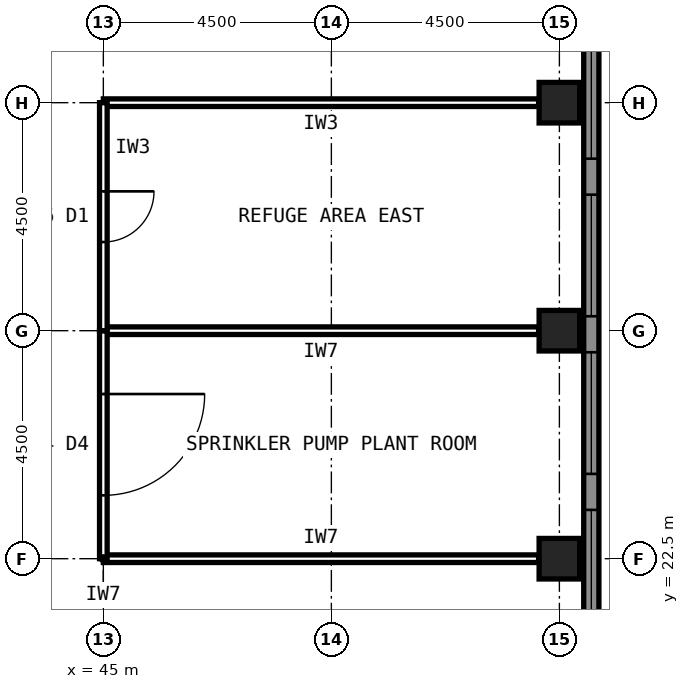
"""IFC4 building model, lengths in metres.
Left out: names, types, materials, properties, quantities, classifications, styles, units other than length and angle.
Written with IfcOpenShell. Run it as: python <this file> out.ifc"""

import sys

from ifc_helpers import new_model, si_unit, direction, frame, frame_2d, origin, origin_2d, place, context, subcontext, project, spatial, rectangle, hollow_rectangle, extrude, element, fill, save


model = new_model("IFC4")
c1 = context("Model", 3, precision=1e-05, world=origin(), true_north=direction((0.0, 1.0)))
c2 = subcontext(c1, "Body", "Model", "MODEL_VIEW")
j1 = project(units=[si_unit("LENGTHUNIT", "METRE"), si_unit("PLANEANGLEUNIT", "RADIAN")], contexts=[c1])
p1 = place(None, origin())
s1 = spatial("IfcSite", under=j1, at=p1, CompositionType="ELEMENT")
p2 = place(p1, origin())
s2 = spatial("IfcBuilding", under=s1, at=p2, CompositionType="ELEMENT")
p3 = place(p2, frame((0.0, 0.0, 199.6)))
s3 = spatial("IfcBuildingStorey", under=s2, at=p3, CompositionType="ELEMENT", Elevation=199.6)
for number, where, z_axis, x_axis in (
    (1, (54.0, 22.5, 0.0), (0.0, 0.0, 1.0), (1.0, 0.0, 0.0)),
    (2, (54.0, 27.0, 0.0), (0.0, 0.0, 1.0), (1.0, 0.0, 0.0)),
    (3, (54.0, 31.5, 0.0), (0.0, 0.0, 1.0), (1.0, 0.0, 0.0)),
):
    element("IfcColumn", number, at=place(p3, frame(where, z_axis=z_axis, x_axis=x_axis)), inside=s3, PredefinedType="COLUMN", context=c2, shape_type="SweptSolid", body=[
        extrude(hollow_rectangle(XDim=0.8, YDim=0.8, WallThickness=0.045, at=origin_2d()), origin(), (0.0, 0.0, 1.0), 6.0),
    ])
p4 = place(p3, frame((54.63, 36.261, 0.0), z_axis=(0.0, 0.0, 1.0), x_axis=(0.0, -1.0, 0.0)))
e4 = element("IfcWall", 4, at=p4, inside=s3, PredefinedType="SOLIDWALL", context=c2, shape_type="SweptSolid", body=[
    extrude(rectangle(XDim=18.663, YDim=0.3, at=frame_2d((9.332, 0.0))), origin(), (0.0, 0.0, 1.0), 6.0),
])
p5 = place(p4, frame((0.355, 0.0, 1.2)))
e5 = element("IfcOpeningElement", 5, at=p5, cuts=e4, PredefinedType="OPENING", context=c2, shape_type="SweptSolid", body=[
    extrude(rectangle(XDim=2.4, YDim=3.0, at=frame_2d((1.2, 1.5))), frame((0.0, 0.16, 0.0), z_axis=(0.0, -1.0, 0.0), x_axis=(1.0, 0.0, 0.0)), (0.0, 0.0, 1.0), 0.32),
])
p6 = place(p4, frame((3.466, 0.0, 1.2)))
e6 = element("IfcOpeningElement", 6, at=p6, cuts=e4, PredefinedType="OPENING", context=c2, shape_type="SweptSolid", body=[
    extrude(rectangle(XDim=2.4, YDim=3.0, at=frame_2d((1.2, 1.5))), frame((0.0, 0.16, 0.0), z_axis=(0.0, -1.0, 0.0), x_axis=(1.0, 0.0, 0.0)), (0.0, 0.0, 1.0), 0.32),
])
p7 = place(p4, frame((6.576, 0.0, 1.2)))
e7 = element("IfcOpeningElement", 7, at=p7, cuts=e4, PredefinedType="OPENING", context=c2, shape_type="SweptSolid", body=[
    extrude(rectangle(XDim=2.4, YDim=3.0, at=frame_2d((1.2, 1.5))), frame((0.0, 0.16, 0.0), z_axis=(0.0, -1.0, 0.0), x_axis=(1.0, 0.0, 0.0)), (0.0, 0.0, 1.0), 0.32),
])
p8 = place(p4, frame((9.687, 0.0, 1.2)))
e8 = element("IfcOpeningElement", 8, at=p8, cuts=e4, PredefinedType="OPENING", context=c2, shape_type="SweptSolid", body=[
    extrude(rectangle(XDim=2.4, YDim=3.0, at=frame_2d((1.2, 1.5))), frame((0.0, 0.16, 0.0), z_axis=(0.0, -1.0, 0.0), x_axis=(1.0, 0.0, 0.0)), (0.0, 0.0, 1.0), 0.32),
])
p9 = place(p4, frame((12.798, 0.0, 1.2)))
e9 = element("IfcOpeningElement", 9, at=p9, cuts=e4, PredefinedType="OPENING", context=c2, shape_type="SweptSolid", body=[
    extrude(rectangle(XDim=2.4, YDim=3.0, at=frame_2d((1.2, 1.5))), frame((0.0, 0.16, 0.0), z_axis=(0.0, -1.0, 0.0), x_axis=(1.0, 0.0, 0.0)), (0.0, 0.0, 1.0), 0.32),
])
p10 = place(p4, frame((15.908, 0.0, 1.2)))
e10 = element("IfcOpeningElement", 10, at=p10, cuts=e4, PredefinedType="OPENING", context=c2, shape_type="SweptSolid", body=[
    extrude(rectangle(XDim=2.4, YDim=3.0, at=frame_2d((1.2, 1.5))), frame((0.0, 0.16, 0.0), z_axis=(0.0, -1.0, 0.0), x_axis=(1.0, 0.0, 0.0)), (0.0, 0.0, 1.0), 0.32),
])
for number, where, z_axis, x_axis in (
    (11, (45.0, 22.5, 0.0), (0.0, 0.0, 1.0), (1.0, 0.0, 0.0)),
    (12, (53.59, 27.0, 0.0), (0.0, 0.0, 1.0), (-1.0, 0.0, 0.0)),
):
    element("IfcWall", number, at=place(p3, frame(where, z_axis=z_axis, x_axis=x_axis)), inside=s3, PredefinedType="PARTITIONING", context=c2, shape_type="SweptSolid", body=[
        extrude(rectangle(XDim=8.59, YDim=0.15, at=frame_2d((4.295, 0.0))), origin(), (0.0, 0.0, 1.0), 4.72),
    ])
p11 = place(p3, frame((45.0, 27.0, 0.0), z_axis=(0.0, 0.0, 1.0), x_axis=(0.0, -1.0, 0.0)))
e13 = element("IfcWall", 13, at=p11, inside=s3, PredefinedType="PARTITIONING", context=c2, shape_type="SweptSolid", body=[
    extrude(rectangle(XDim=4.5, YDim=0.15, at=frame_2d((2.25, 0.0))), origin(), (0.0, 0.0, 1.0), 5.82),
])
p12 = place(p11, frame((1.25, 0.0, 0.0)))
e14 = element("IfcOpeningElement", 14, at=p12, cuts=e13, PredefinedType="OPENING", context=c2, shape_type="SweptSolid", body=[
    extrude(rectangle(XDim=2.0, YDim=2.4, at=frame_2d((1.0, 1.2))), frame((0.0, 0.085, 0.0), z_axis=(0.0, -1.0, 0.0), x_axis=(1.0, 0.0, 0.0)), (0.0, 0.0, 1.0), 0.17),
])
p13 = place(p3, frame((53.59, 31.5, 0.0), z_axis=(0.0, 0.0, 1.0), x_axis=(-1.0, 0.0, 0.0)))
e15 = element("IfcWall", 15, at=p13, inside=s3, PredefinedType="PARTITIONING", context=c2, shape_type="SweptSolid", body=[
    extrude(rectangle(XDim=8.59, YDim=0.15, at=frame_2d((4.295, 0.0))), origin(), (0.0, 0.0, 1.0), 4.72),
])
p14 = place(p3, frame((45.0, 31.5, 0.0), z_axis=(0.0, 0.0, 1.0), x_axis=(0.0, -1.0, 0.0)))
e16 = element("IfcWall", 16, at=p14, inside=s3, PredefinedType="PARTITIONING", context=c2, shape_type="SweptSolid", body=[
    extrude(rectangle(XDim=4.5, YDim=0.15, at=frame_2d((2.25, 0.0))), origin(), (0.0, 0.0, 1.0), 5.82),
])
p15 = place(p14, frame((1.75, 0.0, 0.0)))
e17 = element("IfcOpeningElement", 17, at=p15, cuts=e16, PredefinedType="OPENING", context=c2, shape_type="SweptSolid", body=[
    extrude(rectangle(XDim=1.0, YDim=2.1, at=frame_2d((0.5, 1.05))), frame((0.0, 0.085, 0.0), z_axis=(0.0, -1.0, 0.0), x_axis=(1.0, 0.0, 0.0)), (0.0, 0.0, 1.0), 0.17),
])
p16 = place(p6, origin())
e18 = element("IfcWindow", 18, at=p16, inside=s3, PartitioningType="SINGLE_PANEL", PredefinedType="USERDEFINED", context=c2, shape_type="SweptSolid", body=[
    extrude(rectangle(XDim=2.4, YDim=3.0, at=frame_2d((1.2, 1.5))), frame((0.0, 0.03, 0.0), z_axis=(0.0, -1.0, 0.0), x_axis=(1.0, 0.0, 0.0)), (0.0, 0.0, 1.0), 0.06),
])
fill(e6, e18)
p17 = place(p7, origin())
e19 = element("IfcWindow", 19, at=p17, inside=s3, PartitioningType="SINGLE_PANEL", PredefinedType="USERDEFINED", context=c2, shape_type="SweptSolid", body=[
    extrude(rectangle(XDim=2.4, YDim=3.0, at=frame_2d((1.2, 1.5))), frame((0.0, 0.03, 0.0), z_axis=(0.0, -1.0, 0.0), x_axis=(1.0, 0.0, 0.0)), (0.0, 0.0, 1.0), 0.06),
])
fill(e7, e19)
p18 = place(p8, origin())
e20 = element("IfcWindow", 20, at=p18, inside=s3, PartitioningType="SINGLE_PANEL", PredefinedType="USERDEFINED", context=c2, shape_type="SweptSolid", body=[
    extrude(rectangle(XDim=2.4, YDim=3.0, at=frame_2d((1.2, 1.5))), frame((0.0, 0.03, 0.0), z_axis=(0.0, -1.0, 0.0), x_axis=(1.0, 0.0, 0.0)), (0.0, 0.0, 1.0), 0.06),
])
fill(e8, e20)
p19 = place(p9, origin())
e21 = element("IfcWindow", 21, at=p19, inside=s3, PartitioningType="SINGLE_PANEL", PredefinedType="USERDEFINED", context=c2, shape_type="SweptSolid", body=[
    extrude(rectangle(XDim=2.4, YDim=3.0, at=frame_2d((1.2, 1.5))), frame((0.0, 0.03, 0.0), z_axis=(0.0, -1.0, 0.0), x_axis=(1.0, 0.0, 0.0)), (0.0, 0.0, 1.0), 0.06),
])
fill(e9, e21)
p20 = place(p12, origin())
e22 = element("IfcDoor", 22, at=p20, inside=s3, OperationType="SINGLE_SWING_LEFT", PredefinedType="DOOR", context=c2, shape_type="SweptSolid", body=[
    extrude(rectangle(XDim=2.0, YDim=2.4, at=frame_2d((1.0, 1.2))), frame((0.0, 0.025, 0.0), z_axis=(0.0, -1.0, 0.0), x_axis=(1.0, 0.0, 0.0)), (0.0, 0.0, 1.0), 0.05),
])
fill(e14, e22)
p21 = place(p15, origin())
e23 = element("IfcDoor", 23, at=p21, inside=s3, OperationType="SINGLE_SWING_LEFT", PredefinedType="DOOR", context=c2, shape_type="SweptSolid", body=[
    extrude(rectangle(XDim=1.0, YDim=2.1, at=frame_2d((0.5, 1.05))), frame((0.0, 0.025, 0.0), z_axis=(0.0, -1.0, 0.0), x_axis=(1.0, 0.0, 0.0)), (0.0, 0.0, 1.0), 0.05),
])
fill(e17, e23)
save(model, sys.argv[1])
